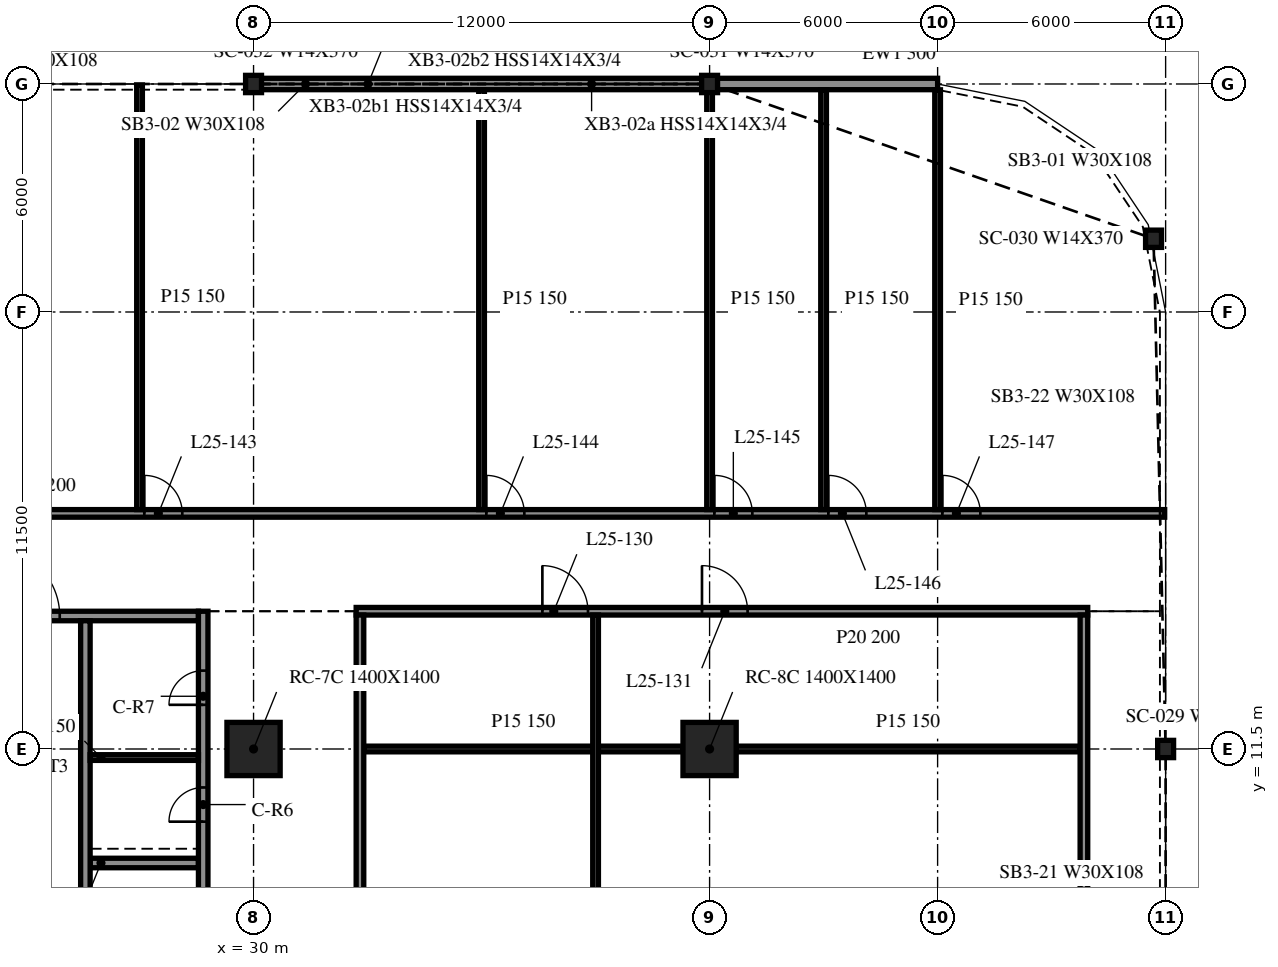
"""IFC4 building model, lengths in metres.
Left out: names, types, materials, properties, quantities, classifications, styles, units other than length and angle.
Written with IfcOpenShell. Run it as: python <this file> out.ifc"""

import sys

from ifc_helpers import new_model, si_unit, direction, frame, frame_2d, origin, origin_2d, place, context, subcontext, project, spatial, rectangle, i_section, extrude, element, fill, save


model = new_model("IFC4")
c1 = context("Model", 3, precision=1e-05, world=origin(), true_north=direction((0.0, 1.0)))
c2 = subcontext(c1, "Body", "Model", "MODEL_VIEW")
j1 = project(units=[si_unit("LENGTHUNIT", "METRE"), si_unit("PLANEANGLEUNIT", "RADIAN")], contexts=[c1])
p1 = place(None, origin())
s1 = spatial("IfcSite", under=j1, at=p1, CompositionType="ELEMENT")
p2 = place(p1, origin())
s2 = spatial("IfcBuilding", under=s1, at=p2, CompositionType="ELEMENT")
p3 = place(p2, frame((0.0, 0.0, 109.4)))
s3 = spatial("IfcBuildingStorey", under=s2, at=p3, CompositionType="ELEMENT", Elevation=109.4)
for number, where, z_axis, x_axis in (
    (1, (30.0, 11.5, -0.34), (0.0, 0.0, 1.0), (1.0, 0.0, 0.0)),
    (2, (42.0, 11.5, -0.34), (0.0, 0.0, 1.0), (1.0, 0.0, 0.0)),
):
    element("IfcColumn", number, at=place(p3, frame(where, z_axis=z_axis, x_axis=x_axis)), inside=s3, PredefinedType="COLUMN", context=c2, shape_type="SweptSolid", body=[
        extrude(rectangle(XDim=1.4, YDim=1.4, at=origin_2d()), origin(), (0.0, 0.0, 1.0), 4.1),
    ])
for number, where, z_axis, x_axis in (
    (3, (53.682, 24.927, -0.34), (0.0, 0.0, 1.0), (1.0, 0.0, 0.0)),
    (4, (42.0, 29.0, -0.34), (0.0, 0.0, 1.0), (1.0, 0.0, 0.0)),
    (5, (30.0, 29.0, -0.34), (0.0, 0.0, 1.0), (1.0, 0.0, 0.0)),
    (6, (54.0, 11.5, -0.34), (0.0, 0.0, 1.0), (1.0, 0.0, 0.0)),
):
    element("IfcColumn", number, at=place(p3, frame(where, z_axis=z_axis, x_axis=x_axis)), inside=s3, PredefinedType="COLUMN", context=c2, shape_type="SweptSolid", body=[
        extrude(i_section(OverallWidth=0.419, OverallDepth=0.455, WebThickness=0.042, FlangeThickness=0.068, at=origin_2d()), origin(), (0.0, 0.0, 1.0), 4.1),
    ])
p4 = place(p3, frame((48.0, 29.0, 0.0), z_axis=(0.0, 0.0, 1.0), x_axis=(-1.0, 0.0, 0.0)))
e7 = element("IfcWall", 7, at=p4, inside=s3, PredefinedType="NOTDEFINED", context=c2, shape_type="SweptSolid", body=[
    extrude(rectangle(XDim=5.979, YDim=0.3, at=frame_2d((2.99, 0.0))), origin(), (0.0, 0.0, 1.0), 3.003),
])
p5 = place(p3, frame((41.979, 29.0, 0.0), z_axis=(0.0, 0.0, 1.0), x_axis=(-1.0, 0.0, 0.0)))
e8 = element("IfcWall", 8, at=p5, inside=s3, PredefinedType="NOTDEFINED", context=c2, shape_type="SweptSolid", body=[
    extrude(rectangle(XDim=11.958, YDim=0.3, at=frame_2d((5.979, 0.0))), origin(), (0.0, 0.0, 1.0), 3.003),
])
p6 = place(p3, frame((28.675, -9.125, 0.0), z_axis=(0.0, 0.0, 1.0), x_axis=(0.0, 1.0, 0.0)))
e9 = element("IfcWall", 9, at=p6, inside=s3, PredefinedType="SOLIDWALL", context=c2, shape_type="SweptSolid", body=[
    extrude(rectangle(XDim=24.25, YDim=0.25, at=frame_2d((12.125, 0.0))), origin(), (0.0, 0.0, 1.0), 3.76),
])
p7 = place(p6, frame((13.075, 0.0, 0.0)))
e10 = element("IfcOpeningElement", 10, at=p7, cuts=e9, PredefinedType="OPENING", context=c2, shape_type="SweptSolid", body=[
    extrude(rectangle(XDim=0.9, YDim=2.1, at=frame_2d((0.45, 1.05))), frame((0.0, 0.135, 0.0), z_axis=(0.0, -1.0, 0.0), x_axis=(1.0, 0.0, 0.0)), (0.0, 0.0, 1.0), 0.27),
])
p8 = place(p6, frame((15.775, 0.0, 0.0)))
e11 = element("IfcOpeningElement", 11, at=p8, cuts=e9, PredefinedType="OPENING", context=c2, shape_type="SweptSolid", body=[
    extrude(rectangle(XDim=0.9, YDim=2.1, at=frame_2d((0.45, 1.05))), frame((0.0, 0.135, 0.0), z_axis=(0.0, -1.0, 0.0), x_axis=(1.0, 0.0, 0.0)), (0.0, 0.0, 1.0), 0.27),
])
p9 = place(p6, frame((18.712, 0.0, 0.0)))
e12 = element("IfcOpeningElement", 12, at=p9, cuts=e9, PredefinedType="OPENING", context=c2, shape_type="SweptSolid", body=[
    extrude(rectangle(XDim=0.9, YDim=2.1, at=frame_2d((0.45, 1.05))), frame((0.0, 0.135, 0.0), z_axis=(0.0, -1.0, 0.0), x_axis=(1.0, 0.0, 0.0)), (0.0, 0.0, 1.0), 0.27),
])
p10 = place(p6, frame((21.788, 0.0, 0.0)))
e13 = element("IfcOpeningElement", 13, at=p10, cuts=e9, PredefinedType="OPENING", context=c2, shape_type="SweptSolid", body=[
    extrude(rectangle(XDim=0.9, YDim=2.1, at=frame_2d((0.45, 1.05))), frame((0.0, 0.135, 0.0), z_axis=(0.0, -1.0, 0.0), x_axis=(1.0, 0.0, 0.0)), (0.0, 0.0, 1.0), 0.27),
])
p11 = place(p3, frame((19.45, 15.0, 0.0), z_axis=(0.0, 0.0, 1.0), x_axis=(1.0, 0.0, 0.0)))
e14 = element("IfcWall", 14, at=p11, inside=s3, PredefinedType="SOLIDWALL", context=c2, shape_type="SweptSolid", body=[
    extrude(rectangle(XDim=9.1, YDim=0.25, at=frame_2d((4.55, 0.0))), origin(), (0.0, 0.0, 1.0), 3.76),
])
p12 = place(p11, frame((3.65, 0.0, 0.0)))
e15 = element("IfcOpeningElement", 15, at=p12, cuts=e14, PredefinedType="OPENING", context=c2, shape_type="SweptSolid", body=[
    extrude(rectangle(XDim=1.8, YDim=2.1, at=frame_2d((0.9, 1.05))), frame((0.0, 0.135, 0.0), z_axis=(0.0, -1.0, 0.0), x_axis=(1.0, 0.0, 0.0)), (0.0, 0.0, 1.0), 0.27),
])
p13 = place(p3, frame((25.575, 14.875, 0.0), z_axis=(0.0, 0.0, 1.0), x_axis=(0.0, -1.0, 0.0)))
e16 = element("IfcWall", 16, at=p13, inside=s3, PredefinedType="SOLIDWALL", context=c2, shape_type="SweptSolid", body=[
    extrude(rectangle(XDim=17.5, YDim=0.25, at=frame_2d((8.75, 0.0))), origin(), (0.0, 0.0, 1.0), 3.76),
])
p14 = place(p13, frame((15.45, 0.0, 0.0)))
e17 = element("IfcOpeningElement", 17, at=p14, cuts=e16, PredefinedType="OPENING", context=c2, shape_type="SweptSolid", body=[
    extrude(rectangle(XDim=1.1, YDim=2.1, at=frame_2d((0.55, 1.05))), frame((0.0, 0.135, 0.0), z_axis=(0.0, -1.0, 0.0), x_axis=(1.0, 0.0, 0.0)), (0.0, 0.0, 1.0), 0.27),
])
p15 = place(p13, frame((12.8, 0.0, 0.0)))
e18 = element("IfcOpeningElement", 18, at=p15, cuts=e16, PredefinedType="OPENING", context=c2, shape_type="SweptSolid", body=[
    extrude(rectangle(XDim=0.9, YDim=2.1, at=frame_2d((0.45, 1.05))), frame((0.0, 0.135, 0.0), z_axis=(0.0, -1.0, 0.0), x_axis=(1.0, 0.0, 0.0)), (0.0, 0.0, 1.0), 0.27),
])
p16 = place(p3, frame((25.7, 8.5, 0.0), z_axis=(0.0, 0.0, 1.0), x_axis=(1.0, 0.0, 0.0)))
e19 = element("IfcWall", 19, at=p16, inside=s3, PredefinedType="SOLIDWALL", context=c2, shape_type="SweptSolid", body=[
    extrude(rectangle(XDim=2.85, YDim=0.25, at=frame_2d((1.425, 0.0))), origin(), (0.0, 0.0, 1.0), 3.76),
])
p17 = place(p3, frame((25.7, 11.275, 0.0), z_axis=(0.0, 0.0, 1.0), x_axis=(1.0, 0.0, 0.0)))
e20 = element("IfcWall", 20, at=p17, inside=s3, PredefinedType="PARTITIONING", context=c2, shape_type="SweptSolid", body=[
    extrude(rectangle(XDim=2.85, YDim=0.15, at=frame_2d((1.425, 0.0))), origin(), (0.0, 0.0, 1.0), 3.76),
])
p18 = place(p3, frame((32.9, 11.5, 0.0), z_axis=(0.0, 0.0, 1.0), x_axis=(1.0, 0.0, 0.0)))
e21 = element("IfcWall", 21, at=p18, inside=s3, PredefinedType="PARTITIONING", context=c2, shape_type="SweptSolid", body=[
    extrude(rectangle(XDim=8.4, YDim=0.15, at=frame_2d((4.2, 0.0))), origin(), (0.0, 0.0, 1.0), 3.76),
])
p19 = place(p3, frame((42.7, 11.5, 0.0), z_axis=(0.0, 0.0, 1.0), x_axis=(1.0, 0.0, 0.0)))
e22 = element("IfcWall", 22, at=p19, inside=s3, PredefinedType="PARTITIONING", context=c2, shape_type="SweptSolid", body=[
    extrude(rectangle(XDim=9.05, YDim=0.15, at=frame_2d((4.525, 0.0))), origin(), (0.0, 0.0, 1.0), 3.76),
])
p20 = place(p3, frame((32.7, 15.125, 0.0), z_axis=(0.0, 0.0, 1.0), x_axis=(1.0, 0.0, 0.0)))
e23 = element("IfcWall", 23, at=p20, inside=s3, PredefinedType="PARTITIONING", context=c2, shape_type="SweptSolid", body=[
    extrude(rectangle(XDim=19.25, YDim=0.2, at=frame_2d((9.625, 0.0))), origin(), (0.0, 0.0, 1.0), 3.76),
])
p21 = place(p20, frame((4.9, 0.0, 0.0)))
e24 = element("IfcOpeningElement", 24, at=p21, cuts=e23, PredefinedType="OPENING", context=c2, shape_type="SweptSolid", body=[
    extrude(rectangle(XDim=1.2, YDim=2.1, at=frame_2d((0.6, 1.05))), frame((0.0, 0.11, 0.0), z_axis=(0.0, -1.0, 0.0), x_axis=(1.0, 0.0, 0.0)), (0.0, 0.0, 1.0), 0.22),
])
p22 = place(p20, frame((9.1, 0.0, 0.0)))
e25 = element("IfcOpeningElement", 25, at=p22, cuts=e23, PredefinedType="OPENING", context=c2, shape_type="SweptSolid", body=[
    extrude(rectangle(XDim=1.2, YDim=2.1, at=frame_2d((0.6, 1.05))), frame((0.0, 0.11, 0.0), z_axis=(0.0, -1.0, 0.0), x_axis=(1.0, 0.0, 0.0)), (0.0, 0.0, 1.0), 0.22),
])
p23 = place(p3, frame((-41.975, 17.7, 0.0), z_axis=(0.0, 0.0, 1.0), x_axis=(1.0, 0.0, 0.0)))
e26 = element("IfcWall", 26, at=p23, inside=s3, PredefinedType="PARTITIONING", context=c2, shape_type="SweptSolid", body=[
    extrude(rectangle(XDim=95.95, YDim=0.2, at=frame_2d((47.975, 0.0))), origin(), (0.0, 0.0, 1.0), 3.76),
])
p24 = place(p23, frame((7.5, 0.0, 0.0)))
e27 = element("IfcOpeningElement", 27, at=p24, cuts=e26, PredefinedType="OPENING", context=c2, shape_type="SweptSolid", body=[
    extrude(rectangle(XDim=1.0, YDim=2.1, at=frame_2d((0.5, 1.05))), frame((0.0, 0.11, 0.0), z_axis=(0.0, -1.0, 0.0), x_axis=(1.0, 0.0, 0.0)), (0.0, 0.0, 1.0), 0.22),
])
p25 = place(p23, frame((16.5, 0.0, 0.0)))
e28 = element("IfcOpeningElement", 28, at=p25, cuts=e26, PredefinedType="OPENING", context=c2, shape_type="SweptSolid", body=[
    extrude(rectangle(XDim=1.0, YDim=2.1, at=frame_2d((0.5, 1.05))), frame((0.0, 0.11, 0.0), z_axis=(0.0, -1.0, 0.0), x_axis=(1.0, 0.0, 0.0)), (0.0, 0.0, 1.0), 0.22),
])
p26 = place(p23, frame((22.5, 0.0, 0.0)))
e29 = element("IfcOpeningElement", 29, at=p26, cuts=e26, PredefinedType="OPENING", context=c2, shape_type="SweptSolid", body=[
    extrude(rectangle(XDim=1.0, YDim=2.1, at=frame_2d((0.5, 1.05))), frame((0.0, 0.11, 0.0), z_axis=(0.0, -1.0, 0.0), x_axis=(1.0, 0.0, 0.0)), (0.0, 0.0, 1.0), 0.22),
])
p27 = place(p23, frame((25.5, 0.0, 0.0)))
e30 = element("IfcOpeningElement", 30, at=p27, cuts=e26, PredefinedType="OPENING", context=c2, shape_type="SweptSolid", body=[
    extrude(rectangle(XDim=1.0, YDim=2.1, at=frame_2d((0.5, 1.05))), frame((0.0, 0.11, 0.0), z_axis=(0.0, -1.0, 0.0), x_axis=(1.0, 0.0, 0.0)), (0.0, 0.0, 1.0), 0.22),
])
p28 = place(p23, frame((28.3, 0.0, 0.0)))
e31 = element("IfcOpeningElement", 31, at=p28, cuts=e26, PredefinedType="OPENING", context=c2, shape_type="SweptSolid", body=[
    extrude(rectangle(XDim=1.2, YDim=2.1, at=frame_2d((0.6, 1.05))), frame((0.0, 0.11, 0.0), z_axis=(0.0, -1.0, 0.0), x_axis=(1.0, 0.0, 0.0)), (0.0, 0.0, 1.0), 0.22),
])
p29 = place(p23, frame((37.5, 0.0, 0.0)))
e32 = element("IfcOpeningElement", 32, at=p29, cuts=e26, PredefinedType="OPENING", context=c2, shape_type="SweptSolid", body=[
    extrude(rectangle(XDim=1.0, YDim=2.1, at=frame_2d((0.5, 1.05))), frame((0.0, 0.11, 0.0), z_axis=(0.0, -1.0, 0.0), x_axis=(1.0, 0.0, 0.0)), (0.0, 0.0, 1.0), 0.22),
])
p30 = place(p23, frame((46.5, 0.0, 0.0)))
e33 = element("IfcOpeningElement", 33, at=p30, cuts=e26, PredefinedType="OPENING", context=c2, shape_type="SweptSolid", body=[
    extrude(rectangle(XDim=1.0, YDim=2.1, at=frame_2d((0.5, 1.05))), frame((0.0, 0.11, 0.0), z_axis=(0.0, -1.0, 0.0), x_axis=(1.0, 0.0, 0.0)), (0.0, 0.0, 1.0), 0.22),
])
p31 = place(p23, frame((48.1, 0.0, 0.0)))
e34 = element("IfcOpeningElement", 34, at=p31, cuts=e26, PredefinedType="OPENING", context=c2, shape_type="SweptSolid", body=[
    extrude(rectangle(XDim=1.0, YDim=2.1, at=frame_2d((0.5, 1.05))), frame((0.0, 0.11, 0.0), z_axis=(0.0, -1.0, 0.0), x_axis=(1.0, 0.0, 0.0)), (0.0, 0.0, 1.0), 0.22),
])
p32 = place(p23, frame((54.1, 0.0, 0.0)))
e35 = element("IfcOpeningElement", 35, at=p32, cuts=e26, PredefinedType="OPENING", context=c2, shape_type="SweptSolid", body=[
    extrude(rectangle(XDim=1.0, YDim=2.1, at=frame_2d((0.5, 1.05))), frame((0.0, 0.11, 0.0), z_axis=(0.0, -1.0, 0.0), x_axis=(1.0, 0.0, 0.0)), (0.0, 0.0, 1.0), 0.22),
])
p33 = place(p23, frame((57.1, 0.0, 0.0)))
e36 = element("IfcOpeningElement", 36, at=p33, cuts=e26, PredefinedType="OPENING", context=c2, shape_type="SweptSolid", body=[
    extrude(rectangle(XDim=1.0, YDim=2.1, at=frame_2d((0.5, 1.05))), frame((0.0, 0.11, 0.0), z_axis=(0.0, -1.0, 0.0), x_axis=(1.0, 0.0, 0.0)), (0.0, 0.0, 1.0), 0.22),
])
p34 = place(p23, frame((60.1, 0.0, 0.0)))
e37 = element("IfcOpeningElement", 37, at=p34, cuts=e26, PredefinedType="OPENING", context=c2, shape_type="SweptSolid", body=[
    extrude(rectangle(XDim=1.2, YDim=2.1, at=frame_2d((0.6, 1.05))), frame((0.0, 0.11, 0.0), z_axis=(0.0, -1.0, 0.0), x_axis=(1.0, 0.0, 0.0)), (0.0, 0.0, 1.0), 0.22),
])
p35 = place(p23, frame((69.1, 0.0, 0.0)))
e38 = element("IfcOpeningElement", 38, at=p35, cuts=e26, PredefinedType="OPENING", context=c2, shape_type="SweptSolid", body=[
    extrude(rectangle(XDim=1.0, YDim=2.1, at=frame_2d((0.5, 1.05))), frame((0.0, 0.11, 0.0), z_axis=(0.0, -1.0, 0.0), x_axis=(1.0, 0.0, 0.0)), (0.0, 0.0, 1.0), 0.22),
])
p36 = place(p23, frame((78.1, 0.0, 0.0)))
e39 = element("IfcOpeningElement", 39, at=p36, cuts=e26, PredefinedType="OPENING", context=c2, shape_type="SweptSolid", body=[
    extrude(rectangle(XDim=1.0, YDim=2.1, at=frame_2d((0.5, 1.05))), frame((0.0, 0.11, 0.0), z_axis=(0.0, -1.0, 0.0), x_axis=(1.0, 0.0, 0.0)), (0.0, 0.0, 1.0), 0.22),
])
p37 = place(p23, frame((84.1, 0.0, 0.0)))
e40 = element("IfcOpeningElement", 40, at=p37, cuts=e26, PredefinedType="OPENING", context=c2, shape_type="SweptSolid", body=[
    extrude(rectangle(XDim=1.0, YDim=2.1, at=frame_2d((0.5, 1.05))), frame((0.0, 0.11, 0.0), z_axis=(0.0, -1.0, 0.0), x_axis=(1.0, 0.0, 0.0)), (0.0, 0.0, 1.0), 0.22),
])
p38 = place(p23, frame((87.1, 0.0, 0.0)))
e41 = element("IfcOpeningElement", 41, at=p38, cuts=e26, PredefinedType="OPENING", context=c2, shape_type="SweptSolid", body=[
    extrude(rectangle(XDim=1.0, YDim=2.1, at=frame_2d((0.5, 1.05))), frame((0.0, 0.11, 0.0), z_axis=(0.0, -1.0, 0.0), x_axis=(1.0, 0.0, 0.0)), (0.0, 0.0, 1.0), 0.22),
])
p39 = place(p23, frame((90.1, 0.0, 0.0)))
e42 = element("IfcOpeningElement", 42, at=p39, cuts=e26, PredefinedType="OPENING", context=c2, shape_type="SweptSolid", body=[
    extrude(rectangle(XDim=1.0, YDim=2.1, at=frame_2d((0.5, 1.05))), frame((0.0, 0.11, 0.0), z_axis=(0.0, -1.0, 0.0), x_axis=(1.0, 0.0, 0.0)), (0.0, 0.0, 1.0), 0.22),
])
p40 = place(p3, frame((27.0, 17.8, 0.0), z_axis=(0.0, 0.0, 1.0), x_axis=(0.0, 1.0, 0.0)))
e43 = element("IfcWall", 43, at=p40, inside=s3, PredefinedType="PARTITIONING", context=c2, shape_type="SweptSolid", body=[
    extrude(rectangle(XDim=11.175, YDim=0.15, at=frame_2d((5.587, 0.0))), origin(), (0.0, 0.0, 1.0), 3.76),
])
p41 = place(p3, frame((32.8, -9.025, 0.0), z_axis=(0.0, 0.0, 1.0), x_axis=(0.0, 1.0, 0.0)))
e44 = element("IfcWall", 44, at=p41, inside=s3, PredefinedType="PARTITIONING", context=c2, shape_type="SweptSolid", body=[
    extrude(rectangle(XDim=24.05, YDim=0.2, at=frame_2d((12.025, 0.0))), origin(), (0.0, 0.0, 1.0), 3.76),
])
p42 = place(p41, frame((10.5, 0.0, 0.0)))
e45 = element("IfcOpeningElement", 45, at=p42, cuts=e44, PredefinedType="OPENING", context=c2, shape_type="SweptSolid", body=[
    extrude(rectangle(XDim=1.2, YDim=2.1, at=frame_2d((0.6, 1.05))), frame((0.0, 0.11, 0.0), z_axis=(0.0, -1.0, 0.0), x_axis=(1.0, 0.0, 0.0)), (0.0, 0.0, 1.0), 0.22),
])
p43 = place(p41, frame((12.3, 0.0, 0.0)))
e46 = element("IfcOpeningElement", 46, at=p43, cuts=e44, PredefinedType="OPENING", context=c2, shape_type="SweptSolid", body=[
    extrude(rectangle(XDim=1.2, YDim=2.1, at=frame_2d((0.6, 1.05))), frame((0.0, 0.11, 0.0), z_axis=(0.0, -1.0, 0.0), x_axis=(1.0, 0.0, 0.0)), (0.0, 0.0, 1.0), 0.22),
])
p44 = place(p3, frame((36.0, 17.8, 0.0), z_axis=(0.0, 0.0, 1.0), x_axis=(0.0, 1.0, 0.0)))
e47 = element("IfcWall", 47, at=p44, inside=s3, PredefinedType="PARTITIONING", context=c2, shape_type="SweptSolid", body=[
    extrude(rectangle(XDim=11.05, YDim=0.15, at=frame_2d((5.525, 0.0))), origin(), (0.0, 0.0, 1.0), 3.76),
])
p45 = place(p3, frame((39.0, -9.025, 0.0), z_axis=(0.0, 0.0, 1.0), x_axis=(0.0, 1.0, 0.0)))
e48 = element("IfcWall", 48, at=p45, inside=s3, PredefinedType="PARTITIONING", context=c2, shape_type="SweptSolid", body=[
    extrude(rectangle(XDim=24.05, YDim=0.15, at=frame_2d((12.025, 0.0))), origin(), (0.0, 0.0, 1.0), 3.76),
])
for number, where, z_axis, x_axis in (
    (49, (42.0, 17.8, 0.0), (0.0, 0.0, 1.0), (0.0, 1.0, 0.0)),
    (50, (45.0, 17.8, 0.0), (0.0, 0.0, 1.0), (0.0, 1.0, 0.0)),
):
    element("IfcWall", number, at=place(p3, frame(where, z_axis=z_axis, x_axis=x_axis)), inside=s3, PredefinedType="PARTITIONING", context=c2, shape_type="SweptSolid", body=[
        extrude(rectangle(XDim=11.05, YDim=0.15, at=frame_2d((5.525, 0.0))), origin(), (0.0, 0.0, 1.0), 3.76),
    ])
p46 = place(p3, frame((48.0, 17.8, 0.0), z_axis=(0.0, 0.0, 1.0), x_axis=(0.0, 1.0, 0.0)))
e51 = element("IfcWall", 51, at=p46, inside=s3, PredefinedType="PARTITIONING", context=c2, shape_type="SweptSolid", body=[
    extrude(rectangle(XDim=11.047, YDim=0.15, at=frame_2d((5.523, 0.0))), origin(), (0.0, 0.0, 1.0), 3.76),
])
p47 = place(p3, frame((51.85, -9.025, 0.0), z_axis=(0.0, 0.0, 1.0), x_axis=(0.0, 1.0, 0.0)))
e52 = element("IfcWall", 52, at=p47, inside=s3, PredefinedType="PARTITIONING", context=c2, shape_type="SweptSolid", body=[
    extrude(rectangle(XDim=24.05, YDim=0.2, at=frame_2d((12.025, 0.0))), origin(), (0.0, 0.0, 1.0), 3.76),
])
p48 = place(p47, frame((12.3, 0.0, 0.0)))
e53 = element("IfcOpeningElement", 53, at=p48, cuts=e52, PredefinedType="OPENING", context=c2, shape_type="SweptSolid", body=[
    extrude(rectangle(XDim=1.2, YDim=2.1, at=frame_2d((0.6, 1.05))), frame((0.0, 0.11, 0.0), z_axis=(0.0, -1.0, 0.0), x_axis=(1.0, 0.0, 0.0)), (0.0, 0.0, 1.0), 0.22),
])
p49 = place(p12, origin())
e54 = element("IfcDoor", 54, at=p49, inside=s3, OperationType="DOUBLE_DOOR_SINGLE_SWING", PredefinedType="DOOR", context=c2, shape_type="SweptSolid", body=[
    extrude(rectangle(XDim=1.8, YDim=2.1, at=frame_2d((0.9, 1.05))), frame((0.0, 0.025, 0.0), z_axis=(0.0, -1.0, 0.0), x_axis=(1.0, 0.0, 0.0)), (0.0, 0.0, 1.0), 0.05),
])
fill(e15, e54)
p50 = place(p9, origin())
e55 = element("IfcDoor", 55, at=p50, inside=s3, OperationType="SINGLE_SWING_RIGHT", PredefinedType="DOOR", context=c2, shape_type="SweptSolid", body=[
    extrude(rectangle(XDim=0.9, YDim=2.1, at=frame_2d((0.45, 1.05))), frame((0.0, 0.025, 0.0), z_axis=(0.0, -1.0, 0.0), x_axis=(1.0, 0.0, 0.0)), (0.0, 0.0, 1.0), 0.05),
])
fill(e12, e55)
p51 = place(p10, origin())
e56 = element("IfcDoor", 56, at=p51, inside=s3, OperationType="SINGLE_SWING_LEFT", PredefinedType="DOOR", context=c2, shape_type="SweptSolid", body=[
    extrude(rectangle(XDim=0.9, YDim=2.1, at=frame_2d((0.45, 1.05))), frame((0.0, 0.025, 0.0), z_axis=(0.0, -1.0, 0.0), x_axis=(1.0, 0.0, 0.0)), (0.0, 0.0, 1.0), 0.05),
])
fill(e13, e56)
p52 = place(p21, origin())
e57 = element("IfcDoor", 57, at=p52, inside=s3, OperationType="SINGLE_SWING_RIGHT", PredefinedType="DOOR", context=c2, shape_type="SweptSolid", body=[
    extrude(rectangle(XDim=1.2, YDim=2.1, at=frame_2d((0.6, 1.05))), frame((0.0, 0.025, 0.0), z_axis=(0.0, -1.0, 0.0), x_axis=(1.0, 0.0, 0.0)), (0.0, 0.0, 1.0), 0.05),
])
fill(e24, e57)
p53 = place(p22, origin())
e58 = element("IfcDoor", 58, at=p53, inside=s3, OperationType="SINGLE_SWING_LEFT", PredefinedType="DOOR", context=c2, shape_type="SweptSolid", body=[
    extrude(rectangle(XDim=1.2, YDim=2.1, at=frame_2d((0.6, 1.05))), frame((0.0, 0.025, 0.0), z_axis=(0.0, -1.0, 0.0), x_axis=(1.0, 0.0, 0.0)), (0.0, 0.0, 1.0), 0.05),
])
fill(e25, e58)
p54 = place(p35, origin())
e59 = element("IfcDoor", 59, at=p54, inside=s3, OperationType="SINGLE_SWING_RIGHT", PredefinedType="DOOR", context=c2, shape_type="SweptSolid", body=[
    extrude(rectangle(XDim=1.0, YDim=2.1, at=frame_2d((0.5, 1.05))), frame((0.0, 0.025, 0.0), z_axis=(0.0, -1.0, 0.0), x_axis=(1.0, 0.0, 0.0)), (0.0, 0.0, 1.0), 0.05),
])
fill(e38, e59)
p55 = place(p36, origin())
e60 = element("IfcDoor", 60, at=p55, inside=s3, OperationType="SINGLE_SWING_RIGHT", PredefinedType="DOOR", context=c2, shape_type="SweptSolid", body=[
    extrude(rectangle(XDim=1.0, YDim=2.1, at=frame_2d((0.5, 1.05))), frame((0.0, 0.025, 0.0), z_axis=(0.0, -1.0, 0.0), x_axis=(1.0, 0.0, 0.0)), (0.0, 0.0, 1.0), 0.05),
])
fill(e39, e60)
p56 = place(p37, origin())
e61 = element("IfcDoor", 61, at=p56, inside=s3, OperationType="SINGLE_SWING_RIGHT", PredefinedType="DOOR", context=c2, shape_type="SweptSolid", body=[
    extrude(rectangle(XDim=1.0, YDim=2.1, at=frame_2d((0.5, 1.05))), frame((0.0, 0.025, 0.0), z_axis=(0.0, -1.0, 0.0), x_axis=(1.0, 0.0, 0.0)), (0.0, 0.0, 1.0), 0.05),
])
fill(e40, e61)
p57 = place(p38, origin())
e62 = element("IfcDoor", 62, at=p57, inside=s3, OperationType="SINGLE_SWING_RIGHT", PredefinedType="DOOR", context=c2, shape_type="SweptSolid", body=[
    extrude(rectangle(XDim=1.0, YDim=2.1, at=frame_2d((0.5, 1.05))), frame((0.0, 0.025, 0.0), z_axis=(0.0, -1.0, 0.0), x_axis=(1.0, 0.0, 0.0)), (0.0, 0.0, 1.0), 0.05),
])
fill(e41, e62)
p58 = place(p39, origin())
e63 = element("IfcDoor", 63, at=p58, inside=s3, OperationType="SINGLE_SWING_RIGHT", PredefinedType="DOOR", context=c2, shape_type="SweptSolid", body=[
    extrude(rectangle(XDim=1.0, YDim=2.1, at=frame_2d((0.5, 1.05))), frame((0.0, 0.025, 0.0), z_axis=(0.0, -1.0, 0.0), x_axis=(1.0, 0.0, 0.0)), (0.0, 0.0, 1.0), 0.05),
])
fill(e42, e63)
save(model, sys.argv[1])
